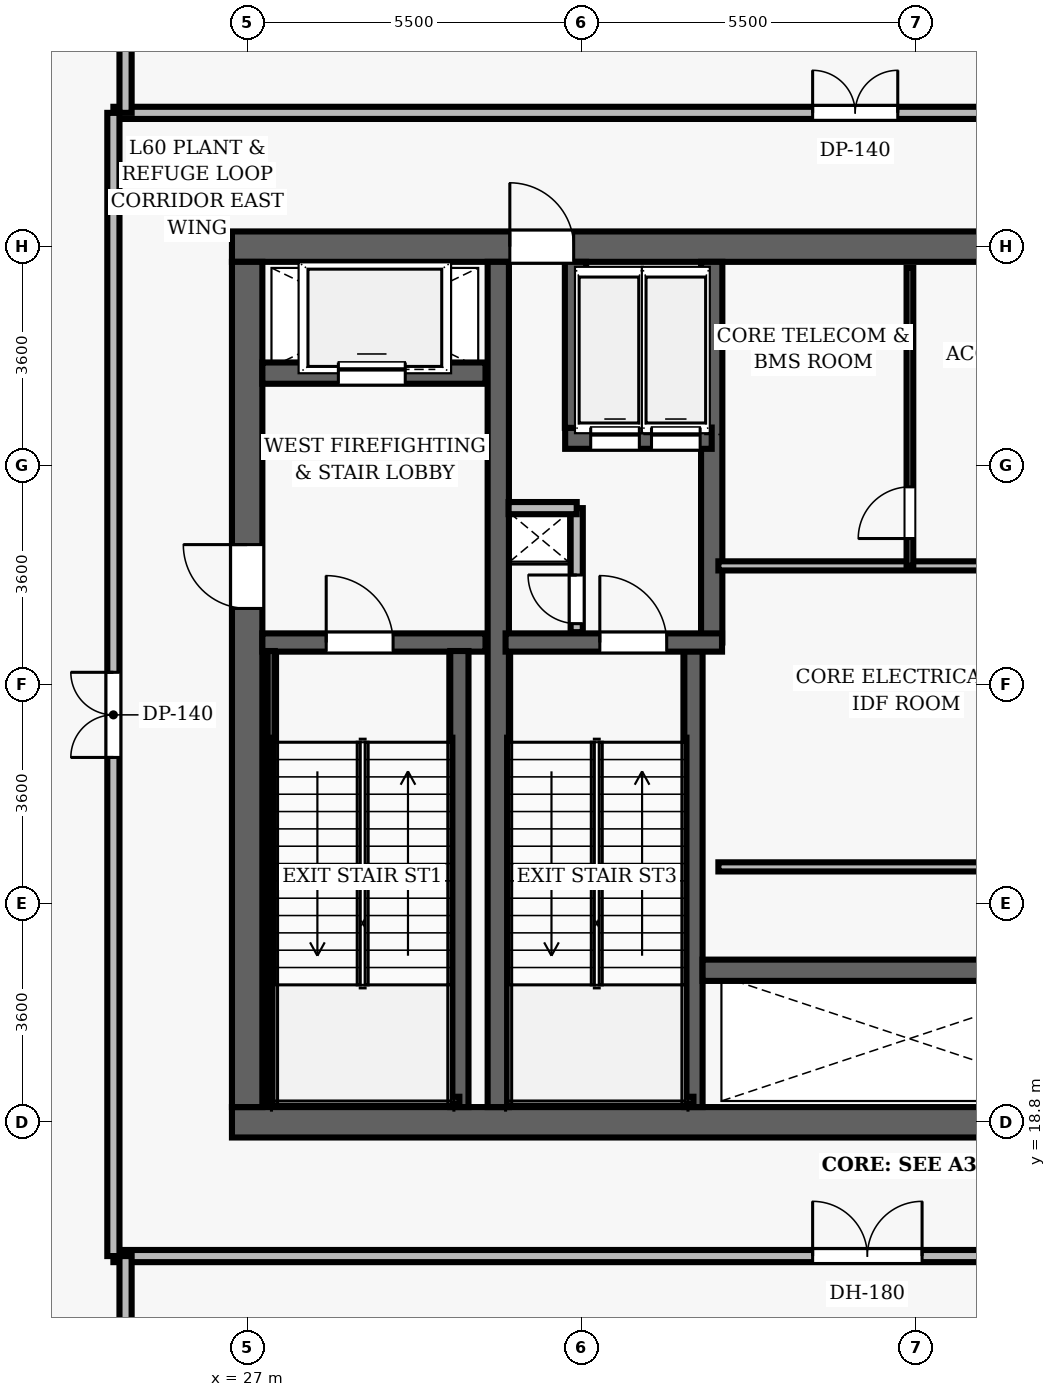
"""IFC4 building model, lengths in metres.
Left out: names, types, materials, properties, quantities, classifications, styles, units other than length and angle.
Written with IfcOpenShell. Run it as: python <this file> out.ifc"""

import sys

from ifc_helpers import new_model, si_unit, direction, frame, frame_2d, origin, place, context, subcontext, project, spatial, rectangle, extrude, element, fill, save


model = new_model("IFC4")
c1 = context("Model", 3, precision=1e-05, world=origin(), true_north=direction((0.0, 1.0)))
c2 = subcontext(c1, "Body", "Model", "MODEL_VIEW")
j1 = project(units=[si_unit("LENGTHUNIT", "METRE"), si_unit("PLANEANGLEUNIT", "RADIAN")], contexts=[c1])
p1 = place(None, origin())
s1 = spatial("IfcSite", under=j1, at=p1, CompositionType="ELEMENT")
p2 = place(p1, origin())
s2 = spatial("IfcBuilding", under=s1, at=p2, CompositionType="ELEMENT")
p3 = place(p2, frame((0.0, 0.0, 236.65)))
s3 = spatial("IfcBuildingStorey", under=s2, at=p3, CompositionType="ELEMENT", Elevation=236.65)
p4 = place(p3, frame((26.75, 18.8, 0.0), z_axis=(0.0, 0.0, 1.0), x_axis=(1.0, 0.0, 0.0)))
e1 = element("IfcWall", 1, at=p4, inside=s3, PredefinedType="SHEAR", context=c2, shape_type="SweptSolid", body=[
    extrude(rectangle(XDim=22.5, YDim=0.5, at=frame_2d((11.25, 0.0))), origin(), (0.0, 0.0, 1.0), 5.4),
])
p5 = place(p4, frame((14.47, 0.0, 0.0)))
e2 = element("IfcOpeningElement", 2, at=p5, cuts=e1, PredefinedType="OPENING", context=c2, shape_type="SweptSolid", body=[
    extrude(rectangle(XDim=1.05, YDim=2.15, at=frame_2d((0.525, 1.075))), frame((0.0, 0.26, 0.0), z_axis=(0.0, -1.0, 0.0), x_axis=(1.0, 0.0, 0.0)), (0.0, 0.0, 1.0), 0.52),
])
p6 = place(p3, frame((26.75, 33.2, 0.0), z_axis=(0.0, 0.0, 1.0), x_axis=(1.0, 0.0, 0.0)))
e3 = element("IfcWall", 3, at=p6, inside=s3, PredefinedType="SHEAR", context=c2, shape_type="SweptSolid", body=[
    extrude(rectangle(XDim=22.5, YDim=0.5, at=frame_2d((11.25, 0.0))), origin(), (0.0, 0.0, 1.0), 5.4),
])
p7 = place(p6, frame((4.57, 0.0, 0.0)))
e4 = element("IfcOpeningElement", 4, at=p7, cuts=e3, PredefinedType="OPENING", context=c2, shape_type="SweptSolid", body=[
    extrude(rectangle(XDim=1.05, YDim=2.15, at=frame_2d((0.525, 1.075))), frame((0.0, 0.26, 0.0), z_axis=(0.0, -1.0, 0.0), x_axis=(1.0, 0.0, 0.0)), (0.0, 0.0, 1.0), 0.52),
])
p8 = place(p6, frame((14.47, 0.0, 0.0)))
e5 = element("IfcOpeningElement", 5, at=p8, cuts=e3, PredefinedType="OPENING", context=c2, shape_type="SweptSolid", body=[
    extrude(rectangle(XDim=1.05, YDim=2.15, at=frame_2d((0.525, 1.075))), frame((0.0, 0.26, 0.0), z_axis=(0.0, -1.0, 0.0), x_axis=(1.0, 0.0, 0.0)), (0.0, 0.0, 1.0), 0.52),
])
p9 = place(p3, frame((27.0, 19.05, 0.0), z_axis=(0.0, 0.0, 1.0), x_axis=(0.0, 1.0, 0.0)))
e6 = element("IfcWall", 6, at=p9, inside=s3, PredefinedType="SHEAR", context=c2, shape_type="SweptSolid", body=[
    extrude(rectangle(XDim=13.9, YDim=0.5, at=frame_2d((6.95, 0.0))), origin(), (0.0, 0.0, 1.0), 5.4),
])
p10 = place(p9, frame((8.2, 0.0, 0.0)))
e7 = element("IfcOpeningElement", 7, at=p10, cuts=e6, PredefinedType="OPENING", context=c2, shape_type="SweptSolid", body=[
    extrude(rectangle(XDim=1.05, YDim=2.15, at=frame_2d((0.525, 1.075))), frame((0.0, 0.26, 0.0), z_axis=(0.0, -1.0, 0.0), x_axis=(1.0, 0.0, 0.0)), (0.0, 0.0, 1.0), 0.52),
])
p11 = place(p3, frame((31.13, 19.05, 0.0), z_axis=(0.0, 0.0, 1.0), x_axis=(0.0, 1.0, 0.0)))
e8 = element("IfcWall", 8, at=p11, inside=s3, PredefinedType="SHEAR", context=c2, shape_type="SweptSolid", body=[
    extrude(rectangle(XDim=13.9, YDim=0.35, at=frame_2d((6.95, 0.0))), origin(), (0.0, 0.0, 1.0), 5.4),
])
p12 = place(p3, frame((27.25, 26.69, 0.0), z_axis=(0.0, 0.0, 1.0), x_axis=(1.0, 0.0, 0.0)))
e9 = element("IfcWall", 9, at=p12, inside=s3, PredefinedType="SHEAR", context=c2, shape_type="SweptSolid", body=[
    extrude(rectangle(XDim=3.67, YDim=0.3, at=frame_2d((1.835, 0.0))), origin(), (0.0, 0.0, 1.0), 5.4),
])
p13 = place(p12, frame((1.05, 0.0, 0.0)))
e10 = element("IfcOpeningElement", 10, at=p13, cuts=e9, PredefinedType="OPENING", context=c2, shape_type="SweptSolid", body=[
    extrude(rectangle(XDim=1.1, YDim=2.15, at=frame_2d((0.55, 1.075))), frame((0.0, 0.16, 0.0), z_axis=(0.0, -1.0, 0.0), x_axis=(1.0, 0.0, 0.0)), (0.0, 0.0, 1.0), 0.32),
])
p14 = place(p3, frame((30.49, 19.05, 0.0), z_axis=(0.0, 0.0, 1.0), x_axis=(0.0, 1.0, 0.0)))
e11 = element("IfcWall", 11, at=p14, inside=s3, PredefinedType="SHEAR", context=c2, shape_type="SweptSolid", body=[
    extrude(rectangle(XDim=7.5, YDim=0.3, at=frame_2d((3.75, 0.0))), origin(), (0.0, 0.0, 1.0), 5.4),
])
p15 = place(p3, frame((27.395, 19.1, 0.0), z_axis=(0.0, 0.0, 1.0), x_axis=(0.0, 1.0, 0.0)))
e12 = element("IfcWall", 12, at=p15, inside=s3, PredefinedType="SHEAR", context=c2, shape_type="SweptSolid", body=[
    extrude(rectangle(XDim=7.45, YDim=0.12, at=frame_2d((3.725, 0.0))), origin(), (0.0, 0.0, 1.0), 5.4),
])
p16 = place(p3, frame((27.395, 19.16, 0.0), z_axis=(0.0, 0.0, 1.0), x_axis=(1.0, 0.0, 0.0)))
e13 = element("IfcWall", 13, at=p16, inside=s3, PredefinedType="SHEAR", context=c2, shape_type="SweptSolid", body=[
    extrude(rectangle(XDim=3.095, YDim=0.12, at=frame_2d((1.547, 0.0))), origin(), (0.0, 0.0, 1.0), 5.4),
])
p17 = place(p3, frame((27.25, 31.12, 0.0), z_axis=(0.0, 0.0, 1.0), x_axis=(1.0, 0.0, 0.0)))
e14 = element("IfcWall", 14, at=p17, inside=s3, PredefinedType="SHEAR", context=c2, shape_type="SweptSolid", body=[
    extrude(rectangle(XDim=3.67, YDim=0.35, at=frame_2d((1.835, 0.0))), origin(), (0.0, 0.0, 1.0), 4.04),
])
p18 = place(p17, frame((1.25, 0.0, 0.0)))
e15 = element("IfcOpeningElement", 15, at=p18, cuts=e14, PredefinedType="OPENING", context=c2, shape_type="SweptSolid", body=[
    extrude(rectangle(XDim=1.1, YDim=2.15, at=frame_2d((0.55, 1.075))), frame((0.0, 0.185, 0.0), z_axis=(0.0, -1.0, 0.0), x_axis=(1.0, 0.0, 0.0)), (0.0, 0.0, 1.0), 0.37),
])
p19 = place(p3, frame((34.34, 19.05, 0.0), z_axis=(0.0, 0.0, 1.0), x_axis=(0.0, 1.0, 0.0)))
e16 = element("IfcWall", 16, at=p19, inside=s3, PredefinedType="SHEAR", context=c2, shape_type="SweptSolid", body=[
    extrude(rectangle(XDim=7.5, YDim=0.3, at=frame_2d((3.75, 0.0))), origin(), (0.0, 0.0, 1.0), 5.4),
])
p20 = place(p3, frame((34.64, 26.69, 0.0), z_axis=(0.0, 0.0, 1.0), x_axis=(0.0, 1.0, 0.0)))
e17 = element("IfcWall", 17, at=p20, inside=s3, PredefinedType="SHEAR", context=c2, shape_type="SweptSolid", body=[
    extrude(rectangle(XDim=6.26, YDim=0.35, at=frame_2d((3.13, 0.0))), origin(), (0.0, 0.0, 1.0), 5.4),
])
p21 = place(p3, frame((31.25, 26.69, 0.0), z_axis=(0.0, 0.0, 1.0), x_axis=(1.0, 0.0, 0.0)))
e18 = element("IfcWall", 18, at=p21, inside=s3, PredefinedType="SHEAR", context=c2, shape_type="SweptSolid", body=[
    extrude(rectangle(XDim=3.56, YDim=0.3, at=frame_2d((1.78, 0.0))), origin(), (0.0, 0.0, 1.0), 5.4),
])
p22 = place(p21, frame((1.55, 0.0, 0.0)))
e19 = element("IfcOpeningElement", 19, at=p22, cuts=e18, PredefinedType="OPENING", context=c2, shape_type="SweptSolid", body=[
    extrude(rectangle(XDim=1.1, YDim=2.15, at=frame_2d((0.55, 1.075))), frame((0.0, 0.16, 0.0), z_axis=(0.0, -1.0, 0.0), x_axis=(1.0, 0.0, 0.0)), (0.0, 0.0, 1.0), 0.32),
])
p23 = place(p3, frame((31.3, 19.16, 0.0), z_axis=(0.0, 0.0, 1.0), x_axis=(1.0, 0.0, 0.0)))
e20 = element("IfcWall", 20, at=p23, inside=s3, PredefinedType="SHEAR", context=c2, shape_type="SweptSolid", body=[
    extrude(rectangle(XDim=3.04, YDim=0.12, at=frame_2d((1.52, 0.0))), origin(), (0.0, 0.0, 1.0), 5.4),
])
p24 = place(p3, frame((32.23, 30.05, 0.0), z_axis=(0.0, 0.0, 1.0), x_axis=(1.0, 0.0, 0.0)))
e21 = element("IfcWall", 21, at=p24, inside=s3, PredefinedType="SHEAR", context=c2, shape_type="SweptSolid", body=[
    extrude(rectangle(XDim=2.41, YDim=0.35, at=frame_2d((1.205, 0.0))), origin(), (0.0, 0.0, 1.0), 4.04),
])
p25 = place(p24, frame((0.42, 0.0, 0.0)))
e22 = element("IfcOpeningElement", 22, at=p25, cuts=e21, PredefinedType="OPENING", context=c2, shape_type="SweptSolid", body=[
    extrude(rectangle(XDim=0.8, YDim=2.15, at=frame_2d((0.4, 1.075))), frame((0.0, 0.185, 0.0), z_axis=(0.0, -1.0, 0.0), x_axis=(1.0, 0.0, 0.0)), (0.0, 0.0, 1.0), 0.37),
])
p26 = place(p24, frame((1.42, 0.0, 0.0)))
e23 = element("IfcOpeningElement", 23, at=p26, cuts=e21, PredefinedType="OPENING", context=c2, shape_type="SweptSolid", body=[
    extrude(rectangle(XDim=0.8, YDim=2.15, at=frame_2d((0.4, 1.075))), frame((0.0, 0.185, 0.0), z_axis=(0.0, -1.0, 0.0), x_axis=(1.0, 0.0, 0.0)), (0.0, 0.0, 1.0), 0.37),
])
p27 = place(p3, frame((32.4, 30.22, 0.0), z_axis=(0.0, 0.0, 1.0), x_axis=(0.0, 1.0, 0.0)))
e24 = element("IfcWall", 24, at=p27, inside=s3, PredefinedType="SHEAR", context=c2, shape_type="SweptSolid", body=[
    extrude(rectangle(XDim=2.73, YDim=0.35, at=frame_2d((1.365, 0.0))), origin(), (0.0, 0.0, 1.0), 4.04),
])
p28 = place(p3, frame((32.42, 26.86, 0.0), z_axis=(0.0, 0.0, 1.0), x_axis=(0.0, 1.0, 0.0)))
e25 = element("IfcWall", 25, at=p28, inside=s3, PredefinedType="PARTITIONING", context=c2, shape_type="SweptSolid", body=[
    extrude(rectangle(XDim=2.04, YDim=0.2, at=frame_2d((1.02, 0.0))), origin(), (0.0, 0.0, 1.0), 4.04),
])
p29 = place(p28, frame((0.14, 0.0, 0.0)))
e26 = element("IfcOpeningElement", 26, at=p29, cuts=e25, PredefinedType="OPENING", context=c2, shape_type="SweptSolid", body=[
    extrude(rectangle(XDim=0.8, YDim=2.05, at=frame_2d((0.4, 1.025))), frame((0.0, 0.11, 0.0), z_axis=(0.0, -1.0, 0.0), x_axis=(1.0, 0.0, 0.0)), (0.0, 0.0, 1.0), 0.22),
])
p30 = place(p3, frame((31.3, 28.9, 0.0), z_axis=(0.0, 0.0, 1.0), x_axis=(1.0, 0.0, 0.0)))
e27 = element("IfcWall", 27, at=p30, inside=s3, PredefinedType="PARTITIONING", context=c2, shape_type="SweptSolid", body=[
    extrude(rectangle(XDim=1.12, YDim=0.2, at=frame_2d((0.56, 0.0))), origin(), (0.0, 0.0, 1.0), 4.04),
])
p31 = place(p3, frame((34.49, 21.3, 0.0), z_axis=(0.0, 0.0, 1.0), x_axis=(1.0, 0.0, 0.0)))
e28 = element("IfcWall", 28, at=p31, inside=s3, PredefinedType="SHEAR", context=c2, shape_type="SweptSolid", body=[
    extrude(rectangle(XDim=6.68, YDim=0.35, at=frame_2d((3.34, 0.0))), origin(), (0.0, 0.0, 1.0), 4.04),
])
for number, where, z_axis, x_axis in (
    (29, (34.75, 23.0, 0.0), (0.0, 0.0, 1.0), (1.0, 0.0, 0.0)),
    (30, (34.75, 27.95, 0.0), (0.0, 0.0, 1.0), (1.0, 0.0, 0.0)),
):
    element("IfcWall", number, at=place(p3, frame(where, z_axis=z_axis, x_axis=x_axis)), inside=s3, PredefinedType="PARTITIONING", context=c2, shape_type="SweptSolid", body=[
        extrude(rectangle(XDim=6.25, YDim=0.15, at=frame_2d((3.125, 0.0))), origin(), (0.0, 0.0, 1.0), 4.04),
    ])
p32 = place(p3, frame((37.9, 27.95, 0.0), z_axis=(0.0, 0.0, 1.0), x_axis=(0.0, 1.0, 0.0)))
e31 = element("IfcWall", 31, at=p32, inside=s3, PredefinedType="PARTITIONING", context=c2, shape_type="SweptSolid", body=[
    extrude(rectangle(XDim=4.9, YDim=0.11, at=frame_2d((2.45, 0.0))), origin(), (0.0, 0.0, 1.0), 4.04),
])
p33 = place(p32, frame((0.45, 0.0, 0.0)))
e32 = element("IfcOpeningElement", 32, at=p33, cuts=e31, PredefinedType="OPENING", context=c2, shape_type="SweptSolid", body=[
    extrude(rectangle(XDim=0.85, YDim=2.1, at=frame_2d((0.425, 1.05))), frame((0.0, 0.065, 0.0), z_axis=(0.0, -1.0, 0.0), x_axis=(1.0, 0.0, 0.0)), (0.0, 0.0, 1.0), 0.13),
])
p34 = place(p3, frame((24.8, 35.4, 0.0), z_axis=(0.0, 0.0, 1.0), x_axis=(1.0, 0.0, 0.0)))
e33 = element("IfcWall", 33, at=p34, inside=s3, PredefinedType="PARTITIONING", context=c2, shape_type="SweptSolid", body=[
    extrude(rectangle(XDim=26.4, YDim=0.2, at=frame_2d((13.2, 0.0))), origin(), (0.0, 0.0, 1.0), 4.04),
])
p35 = place(p34, frame((11.5, 0.0, 0.0)))
e34 = element("IfcOpeningElement", 34, at=p35, cuts=e33, PredefinedType="OPENING", context=c2, shape_type="SweptSolid", body=[
    extrude(rectangle(XDim=1.4, YDim=2.25, at=frame_2d((0.7, 1.125))), frame((0.0, 0.11, 0.0), z_axis=(0.0, -1.0, 0.0), x_axis=(1.0, 0.0, 0.0)), (0.0, 0.0, 1.0), 0.22),
])
p36 = place(p3, frame((24.8, 16.6, 0.0), z_axis=(0.0, 0.0, 1.0), x_axis=(1.0, 0.0, 0.0)))
e35 = element("IfcWall", 35, at=p36, inside=s3, PredefinedType="PARTITIONING", context=c2, shape_type="SweptSolid", body=[
    extrude(rectangle(XDim=26.4, YDim=0.2, at=frame_2d((13.2, 0.0))), origin(), (0.0, 0.0, 1.0), 4.04),
])
p37 = place(p36, frame((11.5, 0.0, 0.0)))
e36 = element("IfcOpeningElement", 36, at=p37, cuts=e35, PredefinedType="OPENING", context=c2, shape_type="SweptSolid", body=[
    extrude(rectangle(XDim=1.8, YDim=2.35, at=frame_2d((0.9, 1.175))), frame((0.0, 0.11, 0.0), z_axis=(0.0, -1.0, 0.0), x_axis=(1.0, 0.0, 0.0)), (0.0, 0.0, 1.0), 0.22),
])
p38 = place(p3, frame((24.8, 16.6, 0.0), z_axis=(0.0, 0.0, 1.0), x_axis=(0.0, 1.0, 0.0)))
e37 = element("IfcWall", 37, at=p38, inside=s3, PredefinedType="PARTITIONING", context=c2, shape_type="SweptSolid", body=[
    extrude(rectangle(XDim=18.8, YDim=0.2, at=frame_2d((9.4, 0.0))), origin(), (0.0, 0.0, 1.0), 4.04),
])
p39 = place(p38, frame((8.2, 0.0, 0.0)))
e38 = element("IfcOpeningElement", 38, at=p39, cuts=e37, PredefinedType="OPENING", context=c2, shape_type="SweptSolid", body=[
    extrude(rectangle(XDim=1.4, YDim=2.25, at=frame_2d((0.7, 1.125))), frame((0.0, 0.11, 0.0), z_axis=(0.0, -1.0, 0.0), x_axis=(1.0, 0.0, 0.0)), (0.0, 0.0, 1.0), 0.22),
])
p40 = place(p3, frame((25.0, 9.789, 0.0), z_axis=(0.0, 0.0, 1.0), x_axis=(0.0, 1.0, 0.0)))
e39 = element("IfcWall", 39, at=p40, inside=s3, PredefinedType="PARTITIONING", context=c2, shape_type="SweptSolid", body=[
    extrude(rectangle(XDim=6.811, YDim=0.2, at=frame_2d((3.406, 0.0))), origin(), (0.0, 0.0, 1.0), 4.04),
])
p41 = place(p3, frame((25.0, 35.4, 0.0), z_axis=(0.0, 0.0, 1.0), x_axis=(0.0, 1.0, 0.0)))
e40 = element("IfcWall", 40, at=p41, inside=s3, PredefinedType="PARTITIONING", context=c2, shape_type="SweptSolid", body=[
    extrude(rectangle(XDim=11.926, YDim=0.2, at=frame_2d((5.963, 0.0))), origin(), (0.0, 0.0, 1.0), 4.04),
])
p42 = place(p13, origin())
e41 = element("IfcDoor", 41, at=p42, inside=s3, OperationType="SINGLE_SWING_LEFT", PredefinedType="DOOR", context=c2, shape_type="SweptSolid", body=[
    extrude(rectangle(XDim=1.1, YDim=2.15, at=frame_2d((0.55, 1.075))), frame((0.0, 0.025, 0.0), z_axis=(0.0, -1.0, 0.0), x_axis=(1.0, 0.0, 0.0)), (0.0, 0.0, 1.0), 0.05),
])
fill(e10, e41)
p43 = place(p10, origin())
e42 = element("IfcDoor", 42, at=p43, inside=s3, OperationType="SINGLE_SWING_RIGHT", PredefinedType="DOOR", context=c2, shape_type="SweptSolid", body=[
    extrude(rectangle(XDim=1.05, YDim=2.15, at=frame_2d((0.525, 1.075))), frame((0.0, 0.025, 0.0), z_axis=(0.0, -1.0, 0.0), x_axis=(1.0, 0.0, 0.0)), (0.0, 0.0, 1.0), 0.05),
])
fill(e7, e42)
p44 = place(p22, origin())
e43 = element("IfcDoor", 43, at=p44, inside=s3, OperationType="SINGLE_SWING_LEFT", PredefinedType="DOOR", context=c2, shape_type="SweptSolid", body=[
    extrude(rectangle(XDim=1.1, YDim=2.15, at=frame_2d((0.55, 1.075))), frame((0.0, 0.025, 0.0), z_axis=(0.0, -1.0, 0.0), x_axis=(1.0, 0.0, 0.0)), (0.0, 0.0, 1.0), 0.05),
])
fill(e19, e43)
p45 = place(p29, origin())
e44 = element("IfcDoor", 44, at=p45, inside=s3, OperationType="SINGLE_SWING_RIGHT", PredefinedType="DOOR", context=c2, shape_type="SweptSolid", body=[
    extrude(rectangle(XDim=0.8, YDim=2.05, at=frame_2d((0.4, 1.025))), frame((0.0, 0.025, 0.0), z_axis=(0.0, -1.0, 0.0), x_axis=(1.0, 0.0, 0.0)), (0.0, 0.0, 1.0), 0.05),
])
fill(e26, e44)
p46 = place(p7, origin())
e45 = element("IfcDoor", 45, at=p46, inside=s3, OperationType="SINGLE_SWING_LEFT", PredefinedType="DOOR", context=c2, shape_type="SweptSolid", body=[
    extrude(rectangle(XDim=1.05, YDim=2.15, at=frame_2d((0.525, 1.075))), frame((0.0, 0.025, 0.0), z_axis=(0.0, -1.0, 0.0), x_axis=(1.0, 0.0, 0.0)), (0.0, 0.0, 1.0), 0.05),
])
fill(e4, e45)
p47 = place(p33, origin())
e46 = element("IfcDoor", 46, at=p47, inside=s3, OperationType="SINGLE_SWING_LEFT", PredefinedType="DOOR", context=c2, shape_type="SweptSolid", body=[
    extrude(rectangle(XDim=0.85, YDim=2.1, at=frame_2d((0.425, 1.05))), frame((0.0, 0.025, 0.0), z_axis=(0.0, -1.0, 0.0), x_axis=(1.0, 0.0, 0.0)), (0.0, 0.0, 1.0), 0.05),
])
fill(e32, e46)
p48 = place(p37, origin())
e47 = element("IfcDoor", 47, at=p48, inside=s3, OperationType="DOUBLE_DOOR_SINGLE_SWING", PredefinedType="DOOR", context=c2, shape_type="SweptSolid", body=[
    extrude(rectangle(XDim=1.8, YDim=2.35, at=frame_2d((0.9, 1.175))), frame((0.0, 0.025, 0.0), z_axis=(0.0, -1.0, 0.0), x_axis=(1.0, 0.0, 0.0)), (0.0, 0.0, 1.0), 0.05),
])
fill(e36, e47)
p49 = place(p35, origin())
e48 = element("IfcDoor", 48, at=p49, inside=s3, OperationType="DOUBLE_DOOR_SINGLE_SWING", PredefinedType="DOOR", context=c2, shape_type="SweptSolid", body=[
    extrude(rectangle(XDim=1.4, YDim=2.25, at=frame_2d((0.7, 1.125))), frame((0.0, 0.025, 0.0), z_axis=(0.0, -1.0, 0.0), x_axis=(1.0, 0.0, 0.0)), (0.0, 0.0, 1.0), 0.05),
])
fill(e34, e48)
p50 = place(p39, origin())
e49 = element("IfcDoor", 49, at=p50, inside=s3, OperationType="DOUBLE_DOOR_SINGLE_SWING", PredefinedType="DOOR", context=c2, shape_type="SweptSolid", body=[
    extrude(rectangle(XDim=1.4, YDim=2.25, at=frame_2d((0.7, 1.125))), frame((0.0, 0.025, 0.0), z_axis=(0.0, -1.0, 0.0), x_axis=(1.0, 0.0, 0.0)), (0.0, 0.0, 1.0), 0.05),
])
fill(e38, e49)
p51 = place(p18, origin())
e50 = element("IfcDoor", 50, at=p51, inside=s3, OperationType="SLIDING_TO_LEFT", PredefinedType="DOOR", context=c2, shape_type="SweptSolid", body=[
    extrude(rectangle(XDim=1.1, YDim=2.15, at=frame_2d((0.55, 1.075))), frame((0.0, 0.025, 0.0), z_axis=(0.0, -1.0, 0.0), x_axis=(1.0, 0.0, 0.0)), (0.0, 0.0, 1.0), 0.05),
])
fill(e15, e50)
p52 = place(p25, origin())
e51 = element("IfcDoor", 51, at=p52, inside=s3, OperationType="SLIDING_TO_LEFT", PredefinedType="DOOR", context=c2, shape_type="SweptSolid", body=[
    extrude(rectangle(XDim=0.8, YDim=2.15, at=frame_2d((0.4, 1.075))), frame((0.0, 0.025, 0.0), z_axis=(0.0, -1.0, 0.0), x_axis=(1.0, 0.0, 0.0)), (0.0, 0.0, 1.0), 0.05),
])
fill(e22, e51)
p53 = place(p26, origin())
e52 = element("IfcDoor", 52, at=p53, inside=s3, OperationType="SLIDING_TO_LEFT", PredefinedType="DOOR", context=c2, shape_type="SweptSolid", body=[
    extrude(rectangle(XDim=0.8, YDim=2.15, at=frame_2d((0.4, 1.075))), frame((0.0, 0.025, 0.0), z_axis=(0.0, -1.0, 0.0), x_axis=(1.0, 0.0, 0.0)), (0.0, 0.0, 1.0), 0.05),
])
fill(e23, e52)
save(model, sys.argv[1])
